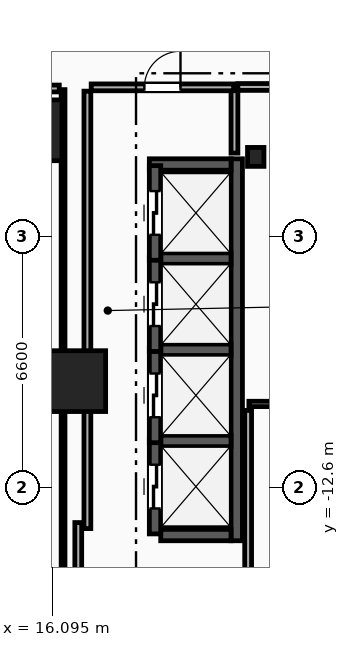
"""IFC4 building model, lengths in metres.
Left out: names, types, materials, properties, quantities, classifications, styles, units other than length and angle.
Written with IfcOpenShell. Run it as: python <this file> out.ifc"""

import sys

from ifc_helpers import new_model, si_unit, direction, frame, frame_2d, origin, origin_2d, place, context, subcontext, project, spatial, rectangle, i_section, extrude, element, fill, save


model = new_model("IFC4")
c1 = context("Model", 3, precision=1e-05, world=origin(), true_north=direction((0.0, 1.0)))
c2 = subcontext(c1, "Body", "Model", "MODEL_VIEW")
j1 = project(units=[si_unit("LENGTHUNIT", "METRE"), si_unit("PLANEANGLEUNIT", "RADIAN")], contexts=[c1])
p1 = place(None, origin())
s1 = spatial("IfcSite", under=j1, at=p1, CompositionType="ELEMENT")
p2 = place(p1, origin())
s2 = spatial("IfcBuilding", under=s1, at=p2, CompositionType="ELEMENT")
p3 = place(p2, origin())
s3 = spatial("IfcBuildingStorey", under=s2, at=p3, CompositionType="ELEMENT", Elevation=0.0)
p4 = place(p3, frame((21.45, -3.9, 0.0), z_axis=(0.0, 0.0, 1.0), x_axis=(1.0, 0.0, 0.0)))
e1 = element("IfcColumn", 1, at=p4, inside=s3, PredefinedType="COLUMN", context=c2, shape_type="SweptSolid", body=[
    extrude(i_section(OverallWidth=0.432, OverallDepth=0.498, WebThickness=0.056, FlangeThickness=0.089, FilletRadius=0.018, at=origin_2d()), origin(), (0.0, 0.0, 1.0), 6.0),
])
for number, where, z_axis, x_axis in (
    (2, (15.55, -3.2, 0.0), (0.0, 0.0, 1.0), (1.0, 0.0, 0.0)),
    (3, (16.7, -9.8, 0.0), (0.0, 0.0, 1.0), (1.0, 0.0, 0.0)),
):
    element("IfcColumn", number, at=place(p3, frame(where, z_axis=z_axis, x_axis=x_axis)), inside=s3, PredefinedType="COLUMN", context=c2, shape_type="SweptSolid", body=[
        extrude(rectangle(XDim=1.6, YDim=1.6, at=origin_2d()), origin(), (0.0, 0.0, 1.0), 6.0),
    ])
p5 = place(p3, frame((20.89, -3.8, 0.0), z_axis=(0.0, 0.0, 1.0), x_axis=(0.0, 1.0, 0.0)))
e4 = element("IfcWall", 4, at=p5, inside=s3, PredefinedType="PARTITIONING", context=c2, shape_type="SweptSolid", body=[
    extrude(rectangle(XDim=1.65, YDim=0.18, at=frame_2d((0.825, 0.0))), origin(), (0.0, 0.0, 1.0), 5.65),
])
p6 = place(p3, frame((20.98, -2.06, 0.0), z_axis=(0.0, 0.0, 1.0), x_axis=(1.0, 0.0, 0.0)))
e5 = element("IfcWall", 5, at=p6, inside=s3, PredefinedType="PARTITIONING", context=c2, shape_type="SweptSolid", body=[
    extrude(rectangle(XDim=3.0, YDim=0.18, at=frame_2d((1.5, 0.0))), origin(), (0.0, 0.0, 1.0), 5.65),
])
p7 = place(p6, frame((0.9, 0.0, 0.0)))
e6 = element("IfcOpeningElement", 6, at=p7, cuts=e5, PredefinedType="OPENING", context=c2, shape_type="SweptSolid", body=[
    extrude(rectangle(XDim=1.2, YDim=2.15, at=frame_2d((0.6, 1.075))), frame((0.0, 0.1, 0.0), z_axis=(0.0, -1.0, 0.0), x_axis=(1.0, 0.0, 0.0)), (0.0, 0.0, 1.0), 0.2),
])
p8 = place(p3, frame((20.95, -14.0, 0.0), z_axis=(0.0, 0.0, 1.0), x_axis=(0.0, 1.0, 0.0)))
e7 = element("IfcWall", 7, at=p8, inside=s3, PredefinedType="SHEAR", context=c2, shape_type="SweptSolid", body=[
    extrude(rectangle(XDim=10.05, YDim=0.3, at=frame_2d((5.025, 0.0))), origin(), (0.0, 0.0, 1.0), 5.65),
])
p9 = place(p3, frame((18.95, -13.85, 0.0), z_axis=(0.0, 0.0, 1.0), x_axis=(1.0, 0.0, 0.0)))
e8 = element("IfcWall", 8, at=p9, inside=s3, PredefinedType="SHEAR", context=c2, shape_type="SweptSolid", body=[
    extrude(rectangle(XDim=1.85, YDim=0.3, at=frame_2d((0.925, 0.0))), origin(), (0.0, 0.0, 1.0), 5.65),
])
p10 = place(p3, frame((18.65, -4.1, 0.0), z_axis=(0.0, 0.0, 1.0), x_axis=(1.0, 0.0, 0.0)))
e9 = element("IfcWall", 9, at=p10, inside=s3, PredefinedType="SHEAR", context=c2, shape_type="SweptSolid", body=[
    extrude(rectangle(XDim=2.15, YDim=0.3, at=frame_2d((1.075, 0.0))), origin(), (0.0, 0.0, 1.0), 5.65),
])
for number, where, z_axis, x_axis in (
    (10, (18.95, -11.375, 0.0), (0.0, 0.0, 1.0), (1.0, 0.0, 0.0)),
    (11, (18.95, -8.975, 0.0), (0.0, 0.0, 1.0), (1.0, 0.0, 0.0)),
    (12, (18.95, -6.575, 0.0), (0.0, 0.0, 1.0), (1.0, 0.0, 0.0)),
):
    element("IfcWall", number, at=place(p3, frame(where, z_axis=z_axis, x_axis=x_axis)), inside=s3, PredefinedType="SHEAR", context=c2, shape_type="SweptSolid", body=[
        extrude(rectangle(XDim=1.85, YDim=0.3, at=frame_2d((0.925, 0.0))), origin(), (0.0, 0.0, 1.0), 5.65),
    ])
p11 = place(p3, frame((18.8, -13.82, 0.0), z_axis=(0.0, 0.0, 1.0), x_axis=(0.0, 1.0, 0.0)))
e13 = element("IfcWall", 13, at=p11, inside=s3, PredefinedType="SHEAR", context=c2, shape_type="SweptSolid", body=[
    extrude(rectangle(XDim=2.49, YDim=0.3, at=frame_2d((1.245, 0.0))), origin(), (0.0, 0.0, 1.0), 5.65),
])
p12 = place(p11, frame((0.67, 0.0, 0.0)))
e14 = element("IfcOpeningElement", 14, at=p12, cuts=e13, PredefinedType="OPENING", context=c2, shape_type="SweptSolid", body=[
    extrude(rectangle(XDim=1.15, YDim=2.2, at=frame_2d((0.575, 1.1))), frame((0.0, 0.16, 0.0), z_axis=(0.0, -1.0, 0.0), x_axis=(1.0, 0.0, 0.0)), (0.0, 0.0, 1.0), 0.32),
])
p13 = place(p3, frame((18.8, -11.42, 0.0), z_axis=(0.0, 0.0, 1.0), x_axis=(0.0, 1.0, 0.0)))
e15 = element("IfcWall", 15, at=p13, inside=s3, PredefinedType="SHEAR", context=c2, shape_type="SweptSolid", body=[
    extrude(rectangle(XDim=2.49, YDim=0.3, at=frame_2d((1.245, 0.0))), origin(), (0.0, 0.0, 1.0), 5.65),
])
p14 = place(p13, frame((0.67, 0.0, 0.0)))
e16 = element("IfcOpeningElement", 16, at=p14, cuts=e15, PredefinedType="OPENING", context=c2, shape_type="SweptSolid", body=[
    extrude(rectangle(XDim=1.15, YDim=2.2, at=frame_2d((0.575, 1.1))), frame((0.0, 0.16, 0.0), z_axis=(0.0, -1.0, 0.0), x_axis=(1.0, 0.0, 0.0)), (0.0, 0.0, 1.0), 0.32),
])
p15 = place(p3, frame((18.8, -9.02, 0.0), z_axis=(0.0, 0.0, 1.0), x_axis=(0.0, 1.0, 0.0)))
e17 = element("IfcWall", 17, at=p15, inside=s3, PredefinedType="SHEAR", context=c2, shape_type="SweptSolid", body=[
    extrude(rectangle(XDim=2.49, YDim=0.3, at=frame_2d((1.245, 0.0))), origin(), (0.0, 0.0, 1.0), 5.65),
])
p16 = place(p15, frame((0.67, 0.0, 0.0)))
e18 = element("IfcOpeningElement", 18, at=p16, cuts=e17, PredefinedType="OPENING", context=c2, shape_type="SweptSolid", body=[
    extrude(rectangle(XDim=1.15, YDim=2.2, at=frame_2d((0.575, 1.1))), frame((0.0, 0.16, 0.0), z_axis=(0.0, -1.0, 0.0), x_axis=(1.0, 0.0, 0.0)), (0.0, 0.0, 1.0), 0.32),
])
p17 = place(p3, frame((18.8, -6.62, 0.0), z_axis=(0.0, 0.0, 1.0), x_axis=(0.0, 1.0, 0.0)))
e19 = element("IfcWall", 19, at=p17, inside=s3, PredefinedType="SHEAR", context=c2, shape_type="SweptSolid", body=[
    extrude(rectangle(XDim=2.49, YDim=0.3, at=frame_2d((1.245, 0.0))), origin(), (0.0, 0.0, 1.0), 5.65),
])
p18 = place(p17, frame((0.67, 0.0, 0.0)))
e20 = element("IfcOpeningElement", 20, at=p18, cuts=e19, PredefinedType="OPENING", context=c2, shape_type="SweptSolid", body=[
    extrude(rectangle(XDim=1.15, YDim=2.2, at=frame_2d((0.575, 1.1))), frame((0.0, 0.16, 0.0), z_axis=(0.0, -1.0, 0.0), x_axis=(1.0, 0.0, 0.0)), (0.0, 0.0, 1.0), 0.32),
])
p19 = place(p3, frame((17.02, -13.68, 0.0), z_axis=(0.0, 0.0, 1.0), x_axis=(0.0, 1.0, 0.0)))
e21 = element("IfcWall", 21, at=p19, inside=s3, PredefinedType="PARTITIONING", context=c2, shape_type="SweptSolid", body=[
    extrude(rectangle(XDim=11.51, YDim=0.18, at=frame_2d((5.755, 0.0))), origin(), (0.0, 0.0, 1.0), 5.65),
])
p20 = place(p3, frame((17.12, -2.07, 0.0), z_axis=(0.0, 0.0, 1.0), x_axis=(1.0, 0.0, 0.0)))
e22 = element("IfcWall", 22, at=p20, inside=s3, PredefinedType="PARTITIONING", context=c2, shape_type="SweptSolid", body=[
    extrude(rectangle(XDim=3.75, YDim=0.18, at=frame_2d((1.875, 0.0))), origin(), (0.0, 0.0, 1.0), 5.65),
])
p21 = place(p20, frame((1.4, 0.0, 0.0)))
e23 = element("IfcOpeningElement", 23, at=p21, cuts=e22, PredefinedType="OPENING", context=c2, shape_type="SweptSolid", body=[
    extrude(rectangle(XDim=0.95, YDim=2.1, at=frame_2d((0.475, 1.05))), frame((0.0, 0.1, 0.0), z_axis=(0.0, -1.0, 0.0), x_axis=(1.0, 0.0, 0.0)), (0.0, 0.0, 1.0), 0.2),
])
p22 = place(p3, frame((21.27, -10.4, 0.0), z_axis=(0.0, 0.0, 1.0), x_axis=(1.0, 0.0, 0.0)))
e24 = element("IfcWall", 24, at=p22, inside=s3, PredefinedType="PARTITIONING", context=c2, shape_type="SweptSolid", body=[
    extrude(rectangle(XDim=0.59, YDim=0.14, at=frame_2d((0.295, 0.0))), origin(), (0.0, 0.0, 1.0), 5.65),
])
p23 = place(p3, frame((21.25, -14.93, 0.0), z_axis=(0.0, 0.0, 1.0), x_axis=(0.0, 1.0, 0.0)))
e25 = element("IfcWall", 25, at=p23, inside=s3, PredefinedType="PARTITIONING", context=c2, shape_type="SweptSolid", body=[
    extrude(rectangle(XDim=4.36, YDim=0.18, at=frame_2d((2.18, 0.0))), origin(), (0.0, 0.0, 1.0), 5.65),
])
p24 = place(p3, frame((-4.5, -2.1, 0.0), z_axis=(0.0, 0.0, 1.0), x_axis=(1.0, 0.0, 0.0)))
e26 = element("IfcWall", 26, at=p24, inside=s3, PredefinedType="PARTITIONING", context=c2, shape_type="SweptSolid", body=[
    extrude(rectangle(XDim=20.78, YDim=0.18, at=frame_2d((10.39, 0.0))), origin(), (0.0, 0.0, 1.0), 4.877),
])
p25 = place(p3, frame((16.78, -13.521, 0.0), z_axis=(0.0, 0.0, 1.0), x_axis=(0.0, -1.0, 0.0)))
e27 = element("IfcWall", 27, at=p25, inside=s3, PredefinedType="PARTITIONING", context=c2, shape_type="SweptSolid", body=[
    extrude(rectangle(XDim=4.907, YDim=0.18, at=frame_2d((2.454, 0.0))), origin(), (0.0, 0.0, 1.0), 5.65),
])
p26 = place(p3, frame((16.38, -19.875, 0.0), z_axis=(0.0, 0.0, 1.0), x_axis=(0.0, 1.0, 0.0)))
e28 = element("IfcWall", 28, at=p26, inside=s3, PredefinedType="PARTITIONING", context=c2, shape_type="SweptSolid", body=[
    extrude(rectangle(XDim=17.745, YDim=0.1, at=frame_2d((8.873, 0.0))), origin(), (0.0, 0.0, 1.0), 4.877),
])
p27 = place(p12, origin())
e29 = element("IfcDoor", 29, at=p27, inside=s3, OperationType="SLIDING_TO_LEFT", PredefinedType="TRAPDOOR", context=c2, shape_type="SweptSolid", body=[
    extrude(rectangle(XDim=1.15, YDim=2.2, at=frame_2d((0.575, 1.1))), frame((0.0, 0.025, 0.0), z_axis=(0.0, -1.0, 0.0), x_axis=(1.0, 0.0, 0.0)), (0.0, 0.0, 1.0), 0.05),
])
fill(e14, e29)
p28 = place(p14, origin())
e30 = element("IfcDoor", 30, at=p28, inside=s3, OperationType="SLIDING_TO_LEFT", PredefinedType="TRAPDOOR", context=c2, shape_type="SweptSolid", body=[
    extrude(rectangle(XDim=1.15, YDim=2.2, at=frame_2d((0.575, 1.1))), frame((0.0, 0.025, 0.0), z_axis=(0.0, -1.0, 0.0), x_axis=(1.0, 0.0, 0.0)), (0.0, 0.0, 1.0), 0.05),
])
fill(e16, e30)
p29 = place(p16, origin())
e31 = element("IfcDoor", 31, at=p29, inside=s3, OperationType="SLIDING_TO_LEFT", PredefinedType="TRAPDOOR", context=c2, shape_type="SweptSolid", body=[
    extrude(rectangle(XDim=1.15, YDim=2.2, at=frame_2d((0.575, 1.1))), frame((0.0, 0.025, 0.0), z_axis=(0.0, -1.0, 0.0), x_axis=(1.0, 0.0, 0.0)), (0.0, 0.0, 1.0), 0.05),
])
fill(e18, e31)
p30 = place(p18, origin())
e32 = element("IfcDoor", 32, at=p30, inside=s3, OperationType="SLIDING_TO_LEFT", PredefinedType="TRAPDOOR", context=c2, shape_type="SweptSolid", body=[
    extrude(rectangle(XDim=1.15, YDim=2.2, at=frame_2d((0.575, 1.1))), frame((0.0, 0.025, 0.0), z_axis=(0.0, -1.0, 0.0), x_axis=(1.0, 0.0, 0.0)), (0.0, 0.0, 1.0), 0.05),
])
fill(e20, e32)
p31 = place(p21, origin())
e33 = element("IfcDoor", 33, at=p31, inside=s3, OperationType="SINGLE_SWING_RIGHT", PredefinedType="DOOR", context=c2, shape_type="SweptSolid", body=[
    extrude(rectangle(XDim=0.95, YDim=2.1, at=frame_2d((0.475, 1.05))), frame((0.0, 0.025, 0.0), z_axis=(0.0, -1.0, 0.0), x_axis=(1.0, 0.0, 0.0)), (0.0, 0.0, 1.0), 0.05),
])
fill(e23, e33)
save(model, sys.argv[1])
